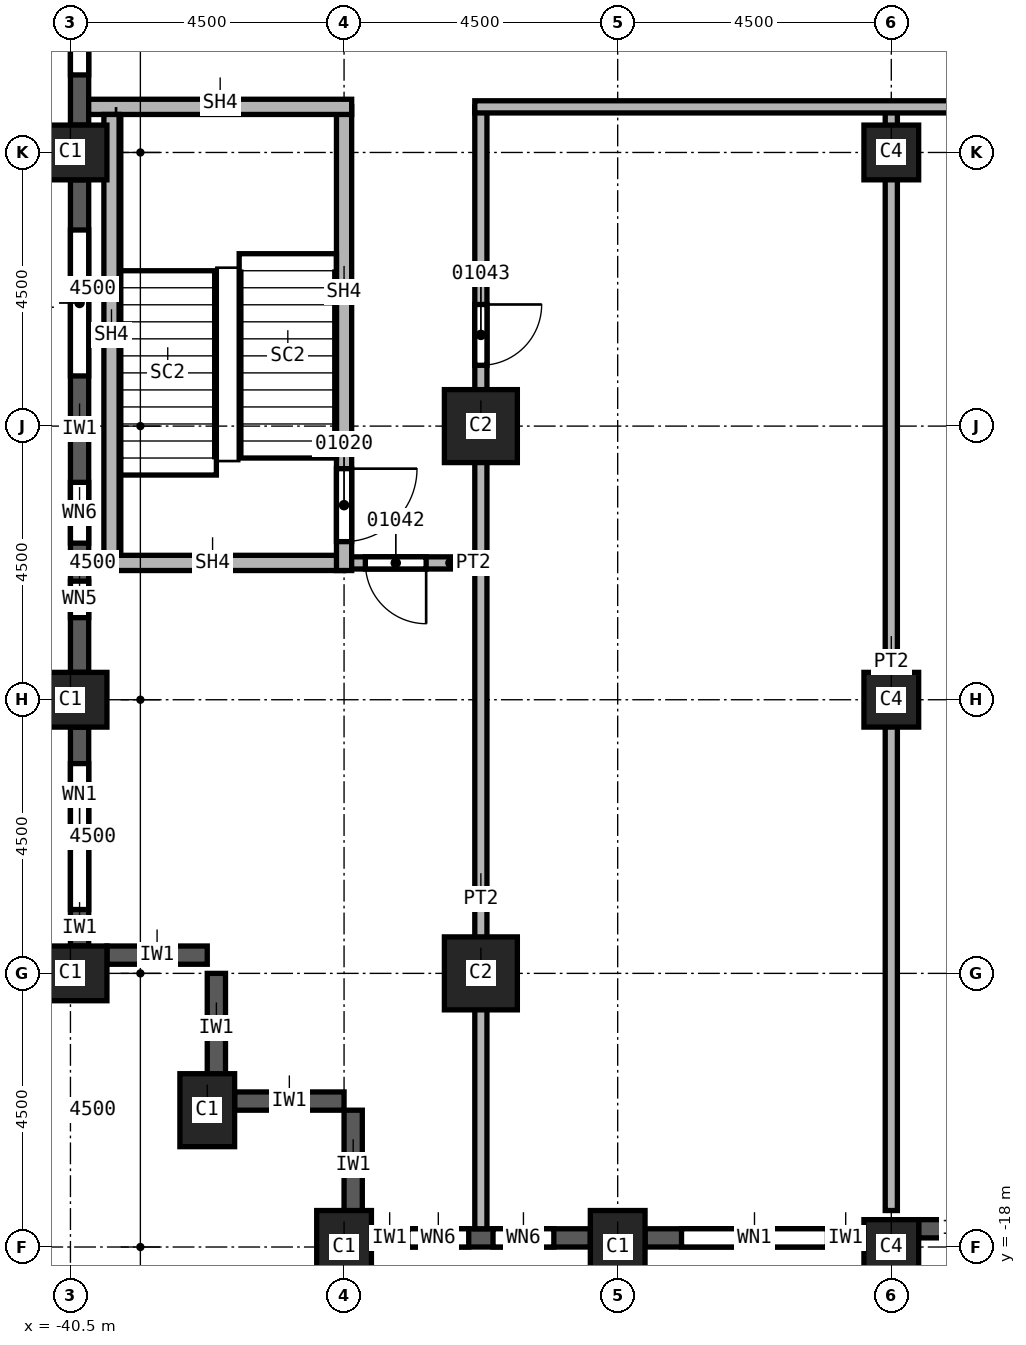
"""IFC4 building model, lengths in metres.
Left out: names, types, materials, properties, quantities, classifications, styles, units other than length and angle.
Written with IfcOpenShell. Run it as: python <this file> out.ifc"""

import sys

from ifc_helpers import new_model, si_unit, direction, frame, frame_2d, origin, origin_2d, place, context, subcontext, project, spatial, rectangle, extrude, element, fill, save


model = new_model("IFC4")
c1 = context("Model", 3, precision=1e-05, world=origin(), true_north=direction((0.0, 1.0)))
c2 = subcontext(c1, "Body", "Model", "MODEL_VIEW")
j1 = project(units=[si_unit("LENGTHUNIT", "METRE"), si_unit("PLANEANGLEUNIT", "RADIAN")], contexts=[c1])
p1 = place(None, origin())
s1 = spatial("IfcSite", under=j1, at=p1, CompositionType="ELEMENT")
p2 = place(p1, origin())
s2 = spatial("IfcBuilding", under=s1, at=p2, CompositionType="ELEMENT")
p3 = place(p2, frame((0.0, 0.0, 68.0)))
s3 = spatial("IfcBuildingStorey", under=s2, at=p3, CompositionType="ELEMENT", Elevation=68.0)
for number, where, z_axis, x_axis in (
    (1, (-40.5, 0.0, 0.0), (0.0, 0.0, 1.0), (0.0, 1.0, 0.0)),
    (2, (-40.5, -9.0, 0.0), (0.0, 0.0, 1.0), (0.0, 1.0, 0.0)),
    (3, (-40.5, -13.5, 0.0), (0.0, 0.0, 1.0), (0.0, 1.0, 0.0)),
    (4, (-38.25, -15.75, 0.0), (0.0, 0.0, 1.0), (1.0, 0.0, 0.0)),
    (5, (-31.5, -18.0, 0.0), (0.0, 0.0, 1.0), (1.0, 0.0, 0.0)),
    (6, (-36.0, -18.0, 0.0), (0.0, 0.0, 1.0), (1.0, 0.0, 0.0)),
):
    element("IfcColumn", number, at=place(p3, frame(where, z_axis=z_axis, x_axis=x_axis)), inside=s3, PredefinedType="COLUMN", context=c2, shape_type="SweptSolid", body=[
        extrude(rectangle(XDim=0.9, YDim=1.2, at=origin_2d()), origin(), (0.0, 0.0, 1.0), 3.7),
    ])
for number, where, z_axis, x_axis in (
    (7, (-33.75, -4.5, 0.0), (0.0, 0.0, 1.0), (1.0, 0.0, 0.0)),
    (8, (-33.75, -13.5, 0.0), (0.0, 0.0, 1.0), (1.0, 0.0, 0.0)),
):
    element("IfcColumn", number, at=place(p3, frame(where, z_axis=z_axis, x_axis=x_axis)), inside=s3, PredefinedType="COLUMN", context=c2, shape_type="SweptSolid", body=[
        extrude(rectangle(XDim=1.2, YDim=1.2, at=origin_2d()), origin(), (0.0, 0.0, 1.0), 3.7),
    ])
for number, where, z_axis, x_axis in (
    (9, (-27.0, 0.0, 0.0), (0.0, 0.0, 1.0), (1.0, 0.0, 0.0)),
    (10, (-27.0, -9.0, 0.0), (0.0, 0.0, 1.0), (1.0, 0.0, 0.0)),
    (11, (-27.0, -18.0, 0.0), (0.0, 0.0, 1.0), (1.0, 0.0, 0.0)),
):
    element("IfcColumn", number, at=place(p3, frame(where, z_axis=z_axis, x_axis=x_axis)), inside=s3, PredefinedType="COLUMN", context=c2, shape_type="SweptSolid", body=[
        extrude(rectangle(XDim=0.9, YDim=0.9, at=origin_2d()), origin(), (0.0, 0.0, 1.0), 3.7),
    ])
p4 = place(p3, frame((-39.9, -13.2, 0.0), z_axis=(0.0, 0.0, 1.0), x_axis=(1.0, 0.0, 0.0)))
e12 = element("IfcWall", 12, at=p4, inside=s3, PredefinedType="SOLIDWALL", context=c2, shape_type="SweptSolid", body=[
    extrude(rectangle(XDim=1.65, YDim=0.3, at=frame_2d((0.825, 0.0))), origin(), (0.0, 0.0, 1.0), 3.1),
])
for number, where, z_axis, x_axis in (
    (13, (-38.1, -15.3, 0.0), (0.0, 0.0, 1.0), (0.0, 1.0, 0.0)),
    (14, (-37.8, -15.6, 0.0), (0.0, 0.0, 1.0), (1.0, 0.0, 0.0)),
    (15, (-35.85, -17.55, 0.0), (0.0, 0.0, 1.0), (0.0, 1.0, 0.0)),
):
    element("IfcWall", number, at=place(p3, frame(where, z_axis=z_axis, x_axis=x_axis)), inside=s3, PredefinedType="SOLIDWALL", context=c2, shape_type="SweptSolid", body=[
        extrude(rectangle(XDim=1.8, YDim=0.3, at=frame_2d((0.9, 0.0))), origin(), (0.0, 0.0, 1.0), 3.1),
    ])
p5 = place(p3, frame((-40.35, 8.55, 0.0), z_axis=(0.0, 0.0, 1.0), x_axis=(0.0, -1.0, 0.0)))
e16 = element("IfcWall", 16, at=p5, inside=s3, PredefinedType="SOLIDWALL", context=c2, shape_type="SweptSolid", body=[
    extrude(rectangle(XDim=8.1, YDim=0.3, at=frame_2d((4.05, 0.0))), origin(), (0.0, 0.0, 1.0), 3.1),
])
p6 = place(p5, frame((0.825, 0.0, 0.8)))
e17 = element("IfcOpeningElement", 17, at=p6, cuts=e16, PredefinedType="OPENING", context=c2, shape_type="SweptSolid", body=[
    extrude(rectangle(XDim=2.4, YDim=1.95, at=frame_2d((1.2, 0.975))), frame((0.0, 0.15, 0.0), z_axis=(0.0, -1.0, 0.0), x_axis=(1.0, 0.0, 0.0)), (0.0, 0.0, 1.0), 0.3),
])
p7 = place(p5, frame((4.875, 0.0, 0.8)))
e18 = element("IfcOpeningElement", 18, at=p7, cuts=e16, PredefinedType="OPENING", context=c2, shape_type="SweptSolid", body=[
    extrude(rectangle(XDim=2.4, YDim=1.95, at=frame_2d((1.2, 0.975))), frame((0.0, 0.15, 0.0), z_axis=(0.0, -1.0, 0.0), x_axis=(1.0, 0.0, 0.0)), (0.0, 0.0, 1.0), 0.3),
])
p8 = place(p3, frame((-40.35, -0.45, 0.0), z_axis=(0.0, 0.0, 1.0), x_axis=(0.0, -1.0, 0.0)))
e19 = element("IfcWall", 19, at=p8, inside=s3, PredefinedType="SOLIDWALL", context=c2, shape_type="SweptSolid", body=[
    extrude(rectangle(XDim=8.1, YDim=0.3, at=frame_2d((4.05, 0.0))), origin(), (0.0, 0.0, 1.0), 3.1),
])
p9 = place(p8, frame((0.825, 0.0, 0.8)))
e20 = element("IfcOpeningElement", 20, at=p9, cuts=e19, PredefinedType="OPENING", context=c2, shape_type="SweptSolid", body=[
    extrude(rectangle(XDim=2.4, YDim=1.95, at=frame_2d((1.2, 0.975))), frame((0.0, 0.15, 0.0), z_axis=(0.0, -1.0, 0.0), x_axis=(1.0, 0.0, 0.0)), (0.0, 0.0, 1.0), 0.3),
])
p10 = place(p8, frame((4.975, 0.0, 0.8)))
e21 = element("IfcOpeningElement", 21, at=p10, cuts=e19, PredefinedType="OPENING", context=c2, shape_type="SweptSolid", body=[
    extrude(rectangle(XDim=1.0, YDim=1.95, at=frame_2d((0.5, 0.975))), frame((0.0, 0.15, 0.0), z_axis=(0.0, -1.0, 0.0), x_axis=(1.0, 0.0, 0.0)), (0.0, 0.0, 1.0), 0.3),
])
p11 = place(p8, frame((6.6, 0.0, 0.8)))
e22 = element("IfcOpeningElement", 22, at=p11, cuts=e19, PredefinedType="OPENING", context=c2, shape_type="SweptSolid", body=[
    extrude(rectangle(XDim=0.6, YDim=1.95, at=frame_2d((0.3, 0.975))), frame((0.0, 0.15, 0.0), z_axis=(0.0, -1.0, 0.0), x_axis=(1.0, 0.0, 0.0)), (0.0, 0.0, 1.0), 0.3),
])
p12 = place(p3, frame((-40.35, -9.45, 0.0), z_axis=(0.0, 0.0, 1.0), x_axis=(0.0, -1.0, 0.0)))
e23 = element("IfcWall", 23, at=p12, inside=s3, PredefinedType="SOLIDWALL", context=c2, shape_type="SweptSolid", body=[
    extrude(rectangle(XDim=3.6, YDim=0.3, at=frame_2d((1.8, 0.0))), origin(), (0.0, 0.0, 1.0), 3.1),
])
p13 = place(p12, frame((0.6, 0.0, 0.8)))
e24 = element("IfcOpeningElement", 24, at=p13, cuts=e23, PredefinedType="OPENING", context=c2, shape_type="SweptSolid", body=[
    extrude(rectangle(XDim=2.4, YDim=1.95, at=frame_2d((1.2, 0.975))), frame((0.0, 0.15, 0.0), z_axis=(0.0, -1.0, 0.0), x_axis=(1.0, 0.0, 0.0)), (0.0, 0.0, 1.0), 0.3),
])
p14 = place(p3, frame((-35.55, -17.85, 0.0), z_axis=(0.0, 0.0, 1.0), x_axis=(1.0, 0.0, 0.0)))
e25 = element("IfcWall", 25, at=p14, inside=s3, PredefinedType="SOLIDWALL", context=c2, shape_type="SweptSolid", body=[
    extrude(rectangle(XDim=3.6, YDim=0.3, at=frame_2d((1.8, 0.0))), origin(), (0.0, 0.0, 1.0), 3.1),
])
p15 = place(p14, frame((0.6, 0.0, 0.8)))
e26 = element("IfcOpeningElement", 26, at=p15, cuts=e25, PredefinedType="OPENING", context=c2, shape_type="SweptSolid", body=[
    extrude(rectangle(XDim=1.0, YDim=1.95, at=frame_2d((0.5, 0.975))), frame((0.0, 0.15, 0.0), z_axis=(0.0, -1.0, 0.0), x_axis=(1.0, 0.0, 0.0)), (0.0, 0.0, 1.0), 0.3),
])
p16 = place(p14, frame((2.0, 0.0, 0.8)))
e27 = element("IfcOpeningElement", 27, at=p16, cuts=e25, PredefinedType="OPENING", context=c2, shape_type="SweptSolid", body=[
    extrude(rectangle(XDim=1.0, YDim=1.95, at=frame_2d((0.5, 0.975))), frame((0.0, 0.15, 0.0), z_axis=(0.0, -1.0, 0.0), x_axis=(1.0, 0.0, 0.0)), (0.0, 0.0, 1.0), 0.3),
])
p17 = place(p3, frame((-31.05, -17.85, 0.0), z_axis=(0.0, 0.0, 1.0), x_axis=(1.0, 0.0, 0.0)))
e28 = element("IfcWall", 28, at=p17, inside=s3, PredefinedType="SOLIDWALL", context=c2, shape_type="SweptSolid", body=[
    extrude(rectangle(XDim=3.6, YDim=0.3, at=frame_2d((1.8, 0.0))), origin(), (0.0, 0.0, 1.0), 3.1),
])
p18 = place(p17, frame((0.6, 0.0, 0.8)))
e29 = element("IfcOpeningElement", 29, at=p18, cuts=e28, PredefinedType="OPENING", context=c2, shape_type="SweptSolid", body=[
    extrude(rectangle(XDim=2.4, YDim=1.95, at=frame_2d((1.2, 0.975))), frame((0.0, 0.15, 0.0), z_axis=(0.0, -1.0, 0.0), x_axis=(1.0, 0.0, 0.0)), (0.0, 0.0, 1.0), 0.3),
])
p19 = place(p3, frame((-26.55, -17.7, 0.0), z_axis=(0.0, 0.0, 1.0), x_axis=(1.0, 0.0, 0.0)))
e30 = element("IfcWall", 30, at=p19, inside=s3, PredefinedType="SOLIDWALL", context=c2, shape_type="SweptSolid", body=[
    extrude(rectangle(XDim=1.35, YDim=0.3, at=frame_2d((0.675, 0.0))), origin(), (0.0, 0.0, 1.0), 3.1),
])
p20 = place(p3, frame((-33.75, 0.75, 0.0), z_axis=(0.0, 0.0, 1.0), x_axis=(0.0, -1.0, 0.0)))
e31 = element("IfcWall", 31, at=p20, inside=s3, PredefinedType="PARTITIONING", context=c2, shape_type="SweptSolid", body=[
    extrude(rectangle(XDim=18.45, YDim=0.2, at=frame_2d((9.225, 0.0))), origin(), (0.0, 0.0, 1.0), 3.7),
])
p21 = place(p20, frame((3.25, 0.0, 0.0)))
e32 = element("IfcOpeningElement", 32, at=p21, cuts=e31, PredefinedType="OPENING", context=c2, shape_type="SweptSolid", body=[
    extrude(rectangle(XDim=1.0, YDim=2.1, at=frame_2d((0.5, 1.05))), frame((0.0, 0.1, 0.0), z_axis=(0.0, -1.0, 0.0), x_axis=(1.0, 0.0, 0.0)), (0.0, 0.0, 1.0), 0.2),
])
p22 = place(p3, frame((-33.65, -6.75, 0.0), z_axis=(0.0, 0.0, 1.0), x_axis=(-1.0, 0.0, 0.0)))
e33 = element("IfcWall", 33, at=p22, inside=s3, PredefinedType="PARTITIONING", context=c2, shape_type="SweptSolid", body=[
    extrude(rectangle(XDim=2.35, YDim=0.2, at=frame_2d((1.175, 0.0))), origin(), (0.0, 0.0, 1.0), 3.7),
])
p23 = place(p22, frame((1.0, 0.0, 0.0)))
e34 = element("IfcOpeningElement", 34, at=p23, cuts=e33, PredefinedType="OPENING", context=c2, shape_type="SweptSolid", body=[
    extrude(rectangle(XDim=1.0, YDim=2.1, at=frame_2d((0.5, 1.05))), frame((0.0, 0.1, 0.0), z_axis=(0.0, -1.0, 0.0), x_axis=(1.0, 0.0, 0.0)), (0.0, 0.0, 1.0), 0.2),
])
p24 = place(p3, frame((-27.0, -17.4, 0.0), z_axis=(0.0, 0.0, 1.0), x_axis=(0.0, 1.0, 0.0)))
e35 = element("IfcWall", 35, at=p24, inside=s3, PredefinedType="PARTITIONING", context=c2, shape_type="SweptSolid", body=[
    extrude(rectangle(XDim=18.15, YDim=0.2, at=frame_2d((9.075, 0.0))), origin(), (0.0, 0.0, 1.0), 3.7),
])
p25 = place(p3, frame((-15.4, 0.75, 0.0), z_axis=(0.0, 0.0, 1.0), x_axis=(-1.0, 0.0, 0.0)))
e36 = element("IfcWall", 36, at=p25, inside=s3, PredefinedType="PARTITIONING", context=c2, shape_type="SweptSolid", body=[
    extrude(rectangle(XDim=18.45, YDim=0.2, at=frame_2d((9.225, 0.0))), origin(), (0.0, 0.0, 1.0), 3.7),
])
p26 = place(p3, frame((-36.0, -6.75, 0.0), z_axis=(0.0, 0.0, 1.0), x_axis=(-1.0, 0.0, 0.0)))
e37 = element("IfcWall", 37, at=p26, inside=s3, PredefinedType="SOLIDWALL", context=c2, shape_type="SweptSolid", body=[
    extrude(rectangle(XDim=4.2, YDim=0.25, at=frame_2d((2.1, 0.0))), origin(), (0.0, 0.0, 1.0), 3.7),
])
p27 = place(p3, frame((-36.0, 0.75, 0.0), z_axis=(0.0, 0.0, 1.0), x_axis=(0.0, -1.0, 0.0)))
e38 = element("IfcWall", 38, at=p27, inside=s3, PredefinedType="SOLIDWALL", context=c2, shape_type="SweptSolid", body=[
    extrude(rectangle(XDim=7.625, YDim=0.25, at=frame_2d((3.812, 0.0))), origin(), (0.0, 0.0, 1.0), 3.7),
])
p28 = place(p27, frame((5.95, 0.0, 0.0)))
e39 = element("IfcOpeningElement", 39, at=p28, cuts=e38, PredefinedType="OPENING", context=c2, shape_type="SweptSolid", body=[
    extrude(rectangle(XDim=1.2, YDim=2.1, at=frame_2d((0.6, 1.05))), frame((0.0, 0.125, 0.0), z_axis=(0.0, -1.0, 0.0), x_axis=(1.0, 0.0, 0.0)), (0.0, 0.0, 1.0), 0.25),
])
p29 = place(p3, frame((-35.875, 0.75, 0.0), z_axis=(0.0, 0.0, 1.0), x_axis=(-1.0, 0.0, 0.0)))
e40 = element("IfcWall", 40, at=p29, inside=s3, PredefinedType="SOLIDWALL", context=c2, shape_type="SweptSolid", body=[
    extrude(rectangle(XDim=4.325, YDim=0.25, at=frame_2d((2.163, 0.0))), origin(), (0.0, 0.0, 1.0), 3.7),
])
p30 = place(p3, frame((-39.825, -6.625, 0.0), z_axis=(0.0, 0.0, 1.0), x_axis=(0.0, 1.0, 0.0)))
e41 = element("IfcWall", 41, at=p30, inside=s3, PredefinedType="SOLIDWALL", context=c2, shape_type="SweptSolid", body=[
    extrude(rectangle(XDim=7.25, YDim=0.25, at=frame_2d((3.625, 0.0))), origin(), (0.0, 0.0, 1.0), 3.7),
])
p31 = place(p7, origin())
e42 = element("IfcWindow", 42, at=p31, inside=s3, PartitioningType="SINGLE_PANEL", PredefinedType="WINDOW", context=c2, shape_type="SweptSolid", body=[
    extrude(rectangle(XDim=2.4, YDim=1.95, at=frame_2d((1.2, 0.975))), frame((0.0, 0.03, 0.0), z_axis=(0.0, -1.0, 0.0), x_axis=(1.0, 0.0, 0.0)), (0.0, 0.0, 1.0), 0.06),
])
fill(e18, e42)
p32 = place(p9, origin())
e43 = element("IfcWindow", 43, at=p32, inside=s3, PartitioningType="SINGLE_PANEL", PredefinedType="WINDOW", context=c2, shape_type="SweptSolid", body=[
    extrude(rectangle(XDim=2.4, YDim=1.95, at=frame_2d((1.2, 0.975))), frame((0.0, 0.03, 0.0), z_axis=(0.0, -1.0, 0.0), x_axis=(1.0, 0.0, 0.0)), (0.0, 0.0, 1.0), 0.06),
])
fill(e20, e43)
p33 = place(p13, origin())
e44 = element("IfcWindow", 44, at=p33, inside=s3, PartitioningType="SINGLE_PANEL", PredefinedType="WINDOW", context=c2, shape_type="SweptSolid", body=[
    extrude(rectangle(XDim=2.4, YDim=1.95, at=frame_2d((1.2, 0.975))), frame((0.0, 0.03, 0.0), z_axis=(0.0, -1.0, 0.0), x_axis=(1.0, 0.0, 0.0)), (0.0, 0.0, 1.0), 0.06),
])
fill(e24, e44)
p34 = place(p18, origin())
e45 = element("IfcWindow", 45, at=p34, inside=s3, PartitioningType="SINGLE_PANEL", PredefinedType="WINDOW", context=c2, shape_type="SweptSolid", body=[
    extrude(rectangle(XDim=2.4, YDim=1.95, at=frame_2d((1.2, 0.975))), frame((0.0, 0.03, 0.0), z_axis=(0.0, -1.0, 0.0), x_axis=(1.0, 0.0, 0.0)), (0.0, 0.0, 1.0), 0.06),
])
fill(e29, e45)
p35 = place(p28, origin())
e46 = element("IfcDoor", 46, at=p35, inside=s3, OperationType="SINGLE_SWING_LEFT", PredefinedType="DOOR", context=c2, shape_type="SweptSolid", body=[
    extrude(rectangle(XDim=1.2, YDim=2.1, at=frame_2d((0.6, 1.05))), frame((0.0, 0.025, 0.0), z_axis=(0.0, -1.0, 0.0), x_axis=(1.0, 0.0, 0.0)), (0.0, 0.0, 1.0), 0.05),
])
fill(e39, e46)
p36 = place(p23, origin())
e47 = element("IfcDoor", 47, at=p36, inside=s3, OperationType="SINGLE_SWING_LEFT", PredefinedType="DOOR", context=c2, shape_type="SweptSolid", body=[
    extrude(rectangle(XDim=1.0, YDim=2.1, at=frame_2d((0.5, 1.05))), frame((0.0, 0.025, 0.0), z_axis=(0.0, -1.0, 0.0), x_axis=(1.0, 0.0, 0.0)), (0.0, 0.0, 1.0), 0.05),
])
fill(e34, e47)
p37 = place(p21, origin())
e48 = element("IfcDoor", 48, at=p37, inside=s3, OperationType="SINGLE_SWING_RIGHT", PredefinedType="DOOR", context=c2, shape_type="SweptSolid", body=[
    extrude(rectangle(XDim=1.0, YDim=2.1, at=frame_2d((0.5, 1.05))), frame((0.0, 0.025, 0.0), z_axis=(0.0, -1.0, 0.0), x_axis=(1.0, 0.0, 0.0)), (0.0, 0.0, 1.0), 0.05),
])
fill(e32, e48)
p38 = place(p10, origin())
e49 = element("IfcWindow", 49, at=p38, inside=s3, PartitioningType="SINGLE_PANEL", PredefinedType="WINDOW", context=c2, shape_type="SweptSolid", body=[
    extrude(rectangle(XDim=1.0, YDim=1.95, at=frame_2d((0.5, 0.975))), frame((0.0, 0.03, 0.0), z_axis=(0.0, -1.0, 0.0), x_axis=(1.0, 0.0, 0.0)), (0.0, 0.0, 1.0), 0.06),
])
fill(e21, e49)
p39 = place(p11, origin())
e50 = element("IfcWindow", 50, at=p39, inside=s3, PartitioningType="SINGLE_PANEL", PredefinedType="WINDOW", context=c2, shape_type="SweptSolid", body=[
    extrude(rectangle(XDim=0.6, YDim=1.95, at=frame_2d((0.3, 0.975))), frame((0.0, 0.03, 0.0), z_axis=(0.0, -1.0, 0.0), x_axis=(1.0, 0.0, 0.0)), (0.0, 0.0, 1.0), 0.06),
])
fill(e22, e50)
p40 = place(p15, origin())
e51 = element("IfcWindow", 51, at=p40, inside=s3, PartitioningType="SINGLE_PANEL", PredefinedType="WINDOW", context=c2, shape_type="SweptSolid", body=[
    extrude(rectangle(XDim=1.0, YDim=1.95, at=frame_2d((0.5, 0.975))), frame((0.0, 0.03, 0.0), z_axis=(0.0, -1.0, 0.0), x_axis=(1.0, 0.0, 0.0)), (0.0, 0.0, 1.0), 0.06),
])
fill(e26, e51)
p41 = place(p16, origin())
e52 = element("IfcWindow", 52, at=p41, inside=s3, PartitioningType="SINGLE_PANEL", PredefinedType="WINDOW", context=c2, shape_type="SweptSolid", body=[
    extrude(rectangle(XDim=1.0, YDim=1.95, at=frame_2d((0.5, 0.975))), frame((0.0, 0.03, 0.0), z_axis=(0.0, -1.0, 0.0), x_axis=(1.0, 0.0, 0.0)), (0.0, 0.0, 1.0), 0.06),
])
fill(e27, e52)
save(model, sys.argv[1])
